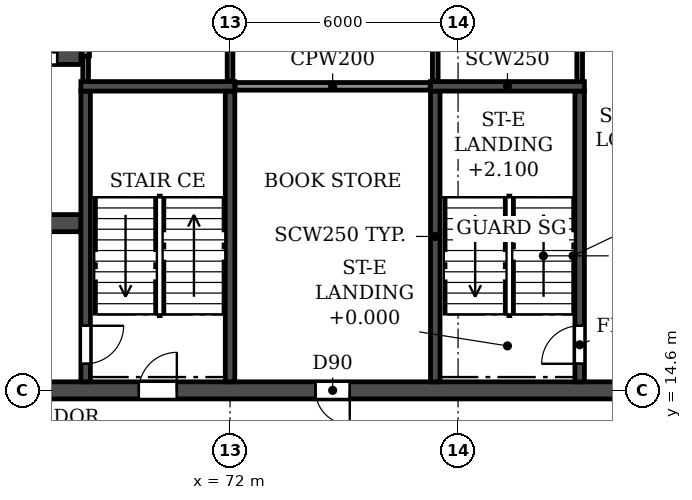
"""IFC4 building model, lengths in metres.
Left out: names, types, materials, properties, quantities, classifications, styles, units other than length and angle.
Written with IfcOpenShell. Run it as: python <this file> out.ifc"""

import sys

from ifc_helpers import new_model, si_unit, direction, frame, frame_2d, origin, place, context, subcontext, project, spatial, rectangle, extrude, element, fill, save


model = new_model("IFC4")
c1 = context("Model", 3, precision=1e-05, world=origin(), true_north=direction((0.0, 1.0)))
c2 = subcontext(c1, "Body", "Model", "MODEL_VIEW")
j1 = project(units=[si_unit("LENGTHUNIT", "METRE"), si_unit("PLANEANGLEUNIT", "RADIAN")], contexts=[c1])
p1 = place(None, origin())
s1 = spatial("IfcSite", under=j1, at=p1, CompositionType="ELEMENT")
p2 = place(p1, origin())
s2 = spatial("IfcBuilding", under=s1, at=p2, CompositionType="ELEMENT")
p3 = place(p2, frame((0.0, 0.0, 15.0)))
s3 = spatial("IfcBuildingStorey", under=s2, at=p3, CompositionType="ELEMENT", Elevation=15.0)
p4 = place(p3, frame((18.0, 14.6, 0.0), z_axis=(0.0, 0.0, 1.0), x_axis=(1.0, 0.0, 0.0)))
e1 = element("IfcWall", 1, at=p4, inside=s3, PredefinedType="SOLIDWALL", context=c2, shape_type="SweptSolid", body=[
    extrude(rectangle(XDim=66.0, YDim=0.45, at=frame_2d((33.0, 0.0))), origin(), (0.0, 0.0, 1.0), 3.92),
])
p5 = place(p4, frame((0.9, 0.0, 0.0)))
e2 = element("IfcOpeningElement", 2, at=p5, cuts=e1, PredefinedType="OPENING", context=c2, shape_type="SweptSolid", body=[
    extrude(rectangle(XDim=1.0, YDim=2.1, at=frame_2d((0.5, 1.05))), frame((0.0, 0.235, 0.0), z_axis=(0.0, -1.0, 0.0), x_axis=(1.0, 0.0, 0.0)), (0.0, 0.0, 1.0), 0.47),
])
p6 = place(p4, frame((8.8, 0.0, 0.0)))
e3 = element("IfcOpeningElement", 3, at=p6, cuts=e1, PredefinedType="OPENING", context=c2, shape_type="SweptSolid", body=[
    extrude(rectangle(XDim=1.0, YDim=2.1, at=frame_2d((0.5, 1.05))), frame((0.0, 0.235, 0.0), z_axis=(0.0, -1.0, 0.0), x_axis=(1.0, 0.0, 0.0)), (0.0, 0.0, 1.0), 0.47),
])
p7 = place(p4, frame((13.4, 0.0, 0.0)))
e4 = element("IfcOpeningElement", 4, at=p7, cuts=e1, PredefinedType="OPENING", context=c2, shape_type="SweptSolid", body=[
    extrude(rectangle(XDim=1.0, YDim=2.1, at=frame_2d((0.5, 1.05))), frame((0.0, 0.235, 0.0), z_axis=(0.0, -1.0, 0.0), x_axis=(1.0, 0.0, 0.0)), (0.0, 0.0, 1.0), 0.47),
])
p8 = place(p4, frame((26.0, 0.0, 0.0)))
e5 = element("IfcOpeningElement", 5, at=p8, cuts=e1, PredefinedType="OPENING", context=c2, shape_type="SweptSolid", body=[
    extrude(rectangle(XDim=1.0, YDim=2.1, at=frame_2d((0.5, 1.05))), frame((0.0, 0.235, 0.0), z_axis=(0.0, -1.0, 0.0), x_axis=(1.0, 0.0, 0.0)), (0.0, 0.0, 1.0), 0.47),
])
p9 = place(p4, frame((29.9, 0.0, 0.0)))
e6 = element("IfcOpeningElement", 6, at=p9, cuts=e1, PredefinedType="OPENING", context=c2, shape_type="SweptSolid", body=[
    extrude(rectangle(XDim=1.0, YDim=2.1, at=frame_2d((0.5, 1.05))), frame((0.0, 0.235, 0.0), z_axis=(0.0, -1.0, 0.0), x_axis=(1.0, 0.0, 0.0)), (0.0, 0.0, 1.0), 0.47),
])
p10 = place(p4, frame((32.5, 0.0, 0.0)))
e7 = element("IfcOpeningElement", 7, at=p10, cuts=e1, PredefinedType="OPENING", context=c2, shape_type="SweptSolid", body=[
    extrude(rectangle(XDim=1.0, YDim=2.1, at=frame_2d((0.5, 1.05))), frame((0.0, 0.235, 0.0), z_axis=(0.0, -1.0, 0.0), x_axis=(1.0, 0.0, 0.0)), (0.0, 0.0, 1.0), 0.47),
])
p11 = place(p4, frame((35.1, 0.0, 0.0)))
e8 = element("IfcOpeningElement", 8, at=p11, cuts=e1, PredefinedType="OPENING", context=c2, shape_type="SweptSolid", body=[
    extrude(rectangle(XDim=1.0, YDim=2.1, at=frame_2d((0.5, 1.05))), frame((0.0, 0.235, 0.0), z_axis=(0.0, -1.0, 0.0), x_axis=(1.0, 0.0, 0.0)), (0.0, 0.0, 1.0), 0.47),
])
p12 = place(p4, frame((39.0, 0.0, 0.0)))
e9 = element("IfcOpeningElement", 9, at=p12, cuts=e1, PredefinedType="OPENING", context=c2, shape_type="SweptSolid", body=[
    extrude(rectangle(XDim=1.0, YDim=2.1, at=frame_2d((0.5, 1.05))), frame((0.0, 0.235, 0.0), z_axis=(0.0, -1.0, 0.0), x_axis=(1.0, 0.0, 0.0)), (0.0, 0.0, 1.0), 0.47),
])
p13 = place(p4, frame((51.6, 0.0, 0.0)))
e10 = element("IfcOpeningElement", 10, at=p13, cuts=e1, PredefinedType="OPENING", context=c2, shape_type="SweptSolid", body=[
    extrude(rectangle(XDim=1.0, YDim=2.1, at=frame_2d((0.5, 1.05))), frame((0.0, 0.235, 0.0), z_axis=(0.0, -1.0, 0.0), x_axis=(1.0, 0.0, 0.0)), (0.0, 0.0, 1.0), 0.47),
])
p14 = place(p4, frame((56.25, 0.0, 0.0)))
e11 = element("IfcOpeningElement", 11, at=p14, cuts=e1, PredefinedType="OPENING", context=c2, shape_type="SweptSolid", body=[
    extrude(rectangle(XDim=0.9, YDim=2.1, at=frame_2d((0.45, 1.05))), frame((0.0, 0.235, 0.0), z_axis=(0.0, -1.0, 0.0), x_axis=(1.0, 0.0, 0.0)), (0.0, 0.0, 1.0), 0.47),
])
p15 = place(p4, frame((64.1, 0.0, 0.0)))
e12 = element("IfcOpeningElement", 12, at=p15, cuts=e1, PredefinedType="OPENING", context=c2, shape_type="SweptSolid", body=[
    extrude(rectangle(XDim=1.0, YDim=2.1, at=frame_2d((0.5, 1.05))), frame((0.0, 0.235, 0.0), z_axis=(0.0, -1.0, 0.0), x_axis=(1.0, 0.0, 0.0)), (0.0, 0.0, 1.0), 0.47),
])
p16 = place(p3, frame((33.925, 19.0, 0.0), z_axis=(0.0, 0.0, 1.0), x_axis=(1.0, 0.0, 0.0)))
e13 = element("IfcWall", 13, at=p16, inside=s3, PredefinedType="SOLIDWALL", context=c2, shape_type="SweptSolid", body=[
    extrude(rectangle(XDim=34.15, YDim=0.45, at=frame_2d((17.075, 0.0))), origin(), (0.0, 0.0, 1.0), 3.92),
])
p17 = place(p16, frame((16.175, 0.0, 0.0)))
e14 = element("IfcOpeningElement", 14, at=p17, cuts=e13, PredefinedType="OPENING", context=c2, shape_type="SweptSolid", body=[
    extrude(rectangle(XDim=1.8, YDim=2.1, at=frame_2d((0.9, 1.05))), frame((0.0, 0.235, 0.0), z_axis=(0.0, -1.0, 0.0), x_axis=(1.0, 0.0, 0.0)), (0.0, 0.0, 1.0), 0.47),
])
p18 = place(p16, frame((1.525, 0.0, 0.0)))
e15 = element("IfcOpeningElement", 15, at=p18, cuts=e13, PredefinedType="OPENING", context=c2, shape_type="SweptSolid", body=[
    extrude(rectangle(XDim=1.8, YDim=2.1, at=frame_2d((0.9, 1.05))), frame((0.0, 0.235, 0.0), z_axis=(0.0, -1.0, 0.0), x_axis=(1.0, 0.0, 0.0)), (0.0, 0.0, 1.0), 0.47),
])
p19 = place(p16, frame((8.725, 0.0, 0.0)))
e16 = element("IfcOpeningElement", 16, at=p19, cuts=e13, PredefinedType="OPENING", context=c2, shape_type="SweptSolid", body=[
    extrude(rectangle(XDim=1.1, YDim=2.1, at=frame_2d((0.55, 1.05))), frame((0.0, 0.235, 0.0), z_axis=(0.0, -1.0, 0.0), x_axis=(1.0, 0.0, 0.0)), (0.0, 0.0, 1.0), 0.47),
])
p20 = place(p16, frame((11.325, 0.0, 0.0)))
e17 = element("IfcOpeningElement", 17, at=p20, cuts=e13, PredefinedType="OPENING", context=c2, shape_type="SweptSolid", body=[
    extrude(rectangle(XDim=1.1, YDim=2.1, at=frame_2d((0.55, 1.05))), frame((0.0, 0.235, 0.0), z_axis=(0.0, -1.0, 0.0), x_axis=(1.0, 0.0, 0.0)), (0.0, 0.0, 1.0), 0.47),
])
p21 = place(p16, frame((13.925, 0.0, 0.0)))
e18 = element("IfcOpeningElement", 18, at=p21, cuts=e13, PredefinedType="OPENING", context=c2, shape_type="SweptSolid", body=[
    extrude(rectangle(XDim=1.1, YDim=2.1, at=frame_2d((0.55, 1.05))), frame((0.0, 0.235, 0.0), z_axis=(0.0, -1.0, 0.0), x_axis=(1.0, 0.0, 0.0)), (0.0, 0.0, 1.0), 0.47),
])
p22 = place(p16, frame((19.125, 0.0, 0.0)))
e19 = element("IfcOpeningElement", 19, at=p22, cuts=e13, PredefinedType="OPENING", context=c2, shape_type="SweptSolid", body=[
    extrude(rectangle(XDim=1.1, YDim=2.1, at=frame_2d((0.55, 1.05))), frame((0.0, 0.235, 0.0), z_axis=(0.0, -1.0, 0.0), x_axis=(1.0, 0.0, 0.0)), (0.0, 0.0, 1.0), 0.47),
])
p23 = place(p16, frame((21.725, 0.0, 0.0)))
e20 = element("IfcOpeningElement", 20, at=p23, cuts=e13, PredefinedType="OPENING", context=c2, shape_type="SweptSolid", body=[
    extrude(rectangle(XDim=1.1, YDim=2.1, at=frame_2d((0.55, 1.05))), frame((0.0, 0.235, 0.0), z_axis=(0.0, -1.0, 0.0), x_axis=(1.0, 0.0, 0.0)), (0.0, 0.0, 1.0), 0.47),
])
p24 = place(p16, frame((24.325, 0.0, 0.0)))
e21 = element("IfcOpeningElement", 21, at=p24, cuts=e13, PredefinedType="OPENING", context=c2, shape_type="SweptSolid", body=[
    extrude(rectangle(XDim=1.1, YDim=2.1, at=frame_2d((0.55, 1.05))), frame((0.0, 0.235, 0.0), z_axis=(0.0, -1.0, 0.0), x_axis=(1.0, 0.0, 0.0)), (0.0, 0.0, 1.0), 0.47),
])
p25 = place(p16, frame((30.825, 0.0, 0.0)))
e22 = element("IfcOpeningElement", 22, at=p25, cuts=e13, PredefinedType="OPENING", context=c2, shape_type="SweptSolid", body=[
    extrude(rectangle(XDim=1.8, YDim=2.1, at=frame_2d((0.9, 1.05))), frame((0.0, 0.235, 0.0), z_axis=(0.0, -1.0, 0.0), x_axis=(1.0, 0.0, 0.0)), (0.0, 0.0, 1.0), 0.47),
])
p26 = place(p3, frame((33.925, 23.4, 0.0), z_axis=(0.0, 0.0, 1.0), x_axis=(1.0, 0.0, 0.0)))
e23 = element("IfcWall", 23, at=p26, inside=s3, PredefinedType="SOLIDWALL", context=c2, shape_type="SweptSolid", body=[
    extrude(rectangle(XDim=34.15, YDim=0.45, at=frame_2d((17.075, 0.0))), origin(), (0.0, 0.0, 1.0), 3.92),
])
p27 = place(p26, frame((16.175, 0.0, 0.0)))
e24 = element("IfcOpeningElement", 24, at=p27, cuts=e23, PredefinedType="OPENING", context=c2, shape_type="SweptSolid", body=[
    extrude(rectangle(XDim=1.8, YDim=2.1, at=frame_2d((0.9, 1.05))), frame((0.0, 0.235, 0.0), z_axis=(0.0, -1.0, 0.0), x_axis=(1.0, 0.0, 0.0)), (0.0, 0.0, 1.0), 0.47),
])
p28 = place(p26, frame((11.025, 0.0, 0.0)))
e25 = element("IfcOpeningElement", 25, at=p28, cuts=e23, PredefinedType="OPENING", context=c2, shape_type="SweptSolid", body=[
    extrude(rectangle(XDim=1.1, YDim=2.1, at=frame_2d((0.55, 1.05))), frame((0.0, 0.235, 0.0), z_axis=(0.0, -1.0, 0.0), x_axis=(1.0, 0.0, 0.0)), (0.0, 0.0, 1.0), 0.47),
])
p29 = place(p26, frame((29.825, 0.0, 0.0)))
e26 = element("IfcOpeningElement", 26, at=p29, cuts=e23, PredefinedType="OPENING", context=c2, shape_type="SweptSolid", body=[
    extrude(rectangle(XDim=1.1, YDim=2.1, at=frame_2d((0.55, 1.05))), frame((0.0, 0.235, 0.0), z_axis=(0.0, -1.0, 0.0), x_axis=(1.0, 0.0, 0.0)), (0.0, 0.0, 1.0), 0.47),
])
p30 = place(p26, frame((32.425, 0.0, 0.0)))
e27 = element("IfcOpeningElement", 27, at=p30, cuts=e23, PredefinedType="OPENING", context=c2, shape_type="SweptSolid", body=[
    extrude(rectangle(XDim=1.1, YDim=2.1, at=frame_2d((0.55, 1.05))), frame((0.0, 0.235, 0.0), z_axis=(0.0, -1.0, 0.0), x_axis=(1.0, 0.0, 0.0)), (0.0, 0.0, 1.0), 0.47),
])
p31 = place(p3, frame((68.2, 14.825, 0.0), z_axis=(0.0, 0.0, 1.0), x_axis=(0.0, 1.0, 0.0)))
e28 = element("IfcWall", 28, at=p31, inside=s3, PredefinedType="SOLIDWALL", context=c2, shape_type="SweptSolid", body=[
    extrude(rectangle(XDim=7.65, YDim=0.25, at=frame_2d((3.825, 0.0))), origin(), (0.0, 0.0, 1.0), 3.92),
])
p32 = place(p31, frame((0.475, 0.0, 0.0)))
e29 = element("IfcOpeningElement", 29, at=p32, cuts=e28, PredefinedType="OPENING", context=c2, shape_type="SweptSolid", body=[
    extrude(rectangle(XDim=1.0, YDim=2.1, at=frame_2d((0.5, 1.05))), frame((0.0, 0.135, 0.0), z_axis=(0.0, -1.0, 0.0), x_axis=(1.0, 0.0, 0.0)), (0.0, 0.0, 1.0), 0.27),
])
p33 = place(p3, frame((72.0, 14.825, 0.0), z_axis=(0.0, 0.0, 1.0), x_axis=(0.0, 1.0, 0.0)))
e30 = element("IfcWall", 30, at=p33, inside=s3, PredefinedType="SOLIDWALL", context=c2, shape_type="SweptSolid", body=[
    extrude(rectangle(XDim=7.65, YDim=0.25, at=frame_2d((3.825, 0.0))), origin(), (0.0, 0.0, 1.0), 3.92),
])
p34 = place(p3, frame((68.075, 22.6, 0.0), z_axis=(0.0, 0.0, 1.0), x_axis=(1.0, 0.0, 0.0)))
e31 = element("IfcWall", 31, at=p34, inside=s3, PredefinedType="SOLIDWALL", context=c2, shape_type="SweptSolid", body=[
    extrude(rectangle(XDim=4.05, YDim=0.25, at=frame_2d((2.025, 0.0))), origin(), (0.0, 0.0, 1.0), 3.92),
])
p35 = place(p3, frame((77.4, 14.825, 0.0), z_axis=(0.0, 0.0, 1.0), x_axis=(0.0, 1.0, 0.0)))
e32 = element("IfcWall", 32, at=p35, inside=s3, PredefinedType="SOLIDWALL", context=c2, shape_type="SweptSolid", body=[
    extrude(rectangle(XDim=7.65, YDim=0.25, at=frame_2d((3.825, 0.0))), origin(), (0.0, 0.0, 1.0), 3.92),
])
p36 = place(p3, frame((81.2, 14.825, 0.0), z_axis=(0.0, 0.0, 1.0), x_axis=(0.0, 1.0, 0.0)))
e33 = element("IfcWall", 33, at=p36, inside=s3, PredefinedType="SOLIDWALL", context=c2, shape_type="SweptSolid", body=[
    extrude(rectangle(XDim=7.65, YDim=0.25, at=frame_2d((3.825, 0.0))), origin(), (0.0, 0.0, 1.0), 3.92),
])
p37 = place(p36, frame((0.475, 0.0, 0.0)))
e34 = element("IfcOpeningElement", 34, at=p37, cuts=e33, PredefinedType="OPENING", context=c2, shape_type="SweptSolid", body=[
    extrude(rectangle(XDim=1.0, YDim=2.1, at=frame_2d((0.5, 1.05))), frame((0.0, 0.135, 0.0), z_axis=(0.0, -1.0, 0.0), x_axis=(1.0, 0.0, 0.0)), (0.0, 0.0, 1.0), 0.27),
])
p38 = place(p3, frame((77.275, 22.6, 0.0), z_axis=(0.0, 0.0, 1.0), x_axis=(1.0, 0.0, 0.0)))
e35 = element("IfcWall", 35, at=p38, inside=s3, PredefinedType="SOLIDWALL", context=c2, shape_type="SweptSolid", body=[
    extrude(rectangle(XDim=4.05, YDim=0.25, at=frame_2d((2.025, 0.0))), origin(), (0.0, 0.0, 1.0), 3.92),
])
p39 = place(p3, frame((72.135, 22.6, 0.0), z_axis=(0.0, 0.0, 1.0), x_axis=(1.0, 0.0, 0.0)))
e36 = element("IfcWall", 36, at=p39, inside=s3, PredefinedType="PARTITIONING", context=c2, shape_type="SweptSolid", body=[
    extrude(rectangle(XDim=5.13, YDim=0.2, at=frame_2d((2.565, 0.0))), origin(), (0.0, 0.0, 1.0), 3.92),
])
p40 = place(p3, frame((68.2, 22.735, 0.0), z_axis=(0.0, 0.0, 1.0), x_axis=(0.0, 1.0, 0.0)))
e37 = element("IfcWall", 37, at=p40, inside=s3, PredefinedType="PARTITIONING", context=c2, shape_type="SweptSolid", body=[
    extrude(rectangle(XDim=0.665, YDim=0.15, at=frame_2d((0.333, 0.0))), origin(), (0.0, 0.0, 1.0), 3.92),
])
for number, where, z_axis, x_axis in (
    (38, (72.0, 22.735, 0.0), (0.0, 0.0, 1.0), (0.0, 1.0, 0.0)),
    (39, (77.4, 22.735, 0.0), (0.0, 0.0, 1.0), (0.0, 1.0, 0.0)),
    (40, (81.2, 22.735, 0.0), (0.0, 0.0, 1.0), (0.0, 1.0, 0.0)),
):
    element("IfcWall", number, at=place(p3, frame(where, z_axis=z_axis, x_axis=x_axis)), inside=s3, PredefinedType="PARTITIONING", context=c2, shape_type="SweptSolid", body=[
        extrude(rectangle(XDim=4.83, YDim=0.15, at=frame_2d((2.415, 0.0))), origin(), (0.0, 0.0, 1.0), 3.92),
    ])
p41 = place(p3, frame((68.2, 23.4, 0.0), z_axis=(0.0, 0.0, 1.0), x_axis=(0.0, 1.0, 0.0)))
e41 = element("IfcWall", 41, at=p41, inside=s3, PredefinedType="PARTITIONING", context=c2, shape_type="SweptSolid", body=[
    extrude(rectangle(XDim=2.7, YDim=0.2, at=frame_2d((1.35, 0.0))), origin(), (0.0, 0.0, 1.0), 3.92),
])
p42 = place(p13, origin())
e42 = element("IfcDoor", 42, at=p42, inside=s3, OperationType="SINGLE_SWING_RIGHT", PredefinedType="DOOR", context=c2, shape_type="SweptSolid", body=[
    extrude(rectangle(XDim=1.0, YDim=2.1, at=frame_2d((0.5, 1.05))), frame((0.0, 0.025, 0.0), z_axis=(0.0, -1.0, 0.0), x_axis=(1.0, 0.0, 0.0)), (0.0, 0.0, 1.0), 0.05),
])
fill(e10, e42)
p43 = place(p14, frame((0.9, 0.0, 0.0), z_axis=(0.0, 0.0, 1.0), x_axis=(-1.0, 0.0, 0.0)))
e43 = element("IfcDoor", 43, at=p43, inside=s3, OperationType="SINGLE_SWING_LEFT", PredefinedType="DOOR", context=c2, shape_type="SweptSolid", body=[
    extrude(rectangle(XDim=0.9, YDim=2.1, at=frame_2d((0.45, 1.05))), frame((0.0, 0.025, 0.0), z_axis=(0.0, -1.0, 0.0), x_axis=(1.0, 0.0, 0.0)), (0.0, 0.0, 1.0), 0.05),
])
fill(e11, e43)
p44 = place(p32, frame((1.0, 0.0, 0.0), z_axis=(0.0, 0.0, 1.0), x_axis=(-1.0, 0.0, 0.0)))
e44 = element("IfcDoor", 44, at=p44, inside=s3, OperationType="SINGLE_SWING_LEFT", PredefinedType="DOOR", context=c2, shape_type="SweptSolid", body=[
    extrude(rectangle(XDim=1.0, YDim=2.1, at=frame_2d((0.5, 1.05))), frame((0.0, 0.025, 0.0), z_axis=(0.0, -1.0, 0.0), x_axis=(1.0, 0.0, 0.0)), (0.0, 0.0, 1.0), 0.05),
])
fill(e29, e44)
p45 = place(p30, origin())
e45 = element("IfcDoor", 45, at=p45, inside=s3, OperationType="DOUBLE_DOOR_SLIDING", PredefinedType="DOOR", context=c2, shape_type="SweptSolid", body=[
    extrude(rectangle(XDim=1.1, YDim=2.1, at=frame_2d((0.55, 1.05))), frame((0.0, 0.025, 0.0), z_axis=(0.0, -1.0, 0.0), x_axis=(1.0, 0.0, 0.0)), (0.0, 0.0, 1.0), 0.05),
])
fill(e27, e45)
p46 = place(p37, origin())
e46 = element("IfcDoor", 46, at=p46, inside=s3, OperationType="SINGLE_SWING_LEFT", PredefinedType="DOOR", context=c2, shape_type="SweptSolid", body=[
    extrude(rectangle(XDim=1.0, YDim=2.1, at=frame_2d((0.5, 1.05))), frame((0.0, 0.025, 0.0), z_axis=(0.0, -1.0, 0.0), x_axis=(1.0, 0.0, 0.0)), (0.0, 0.0, 1.0), 0.05),
])
fill(e34, e46)
save(model, sys.argv[1])
